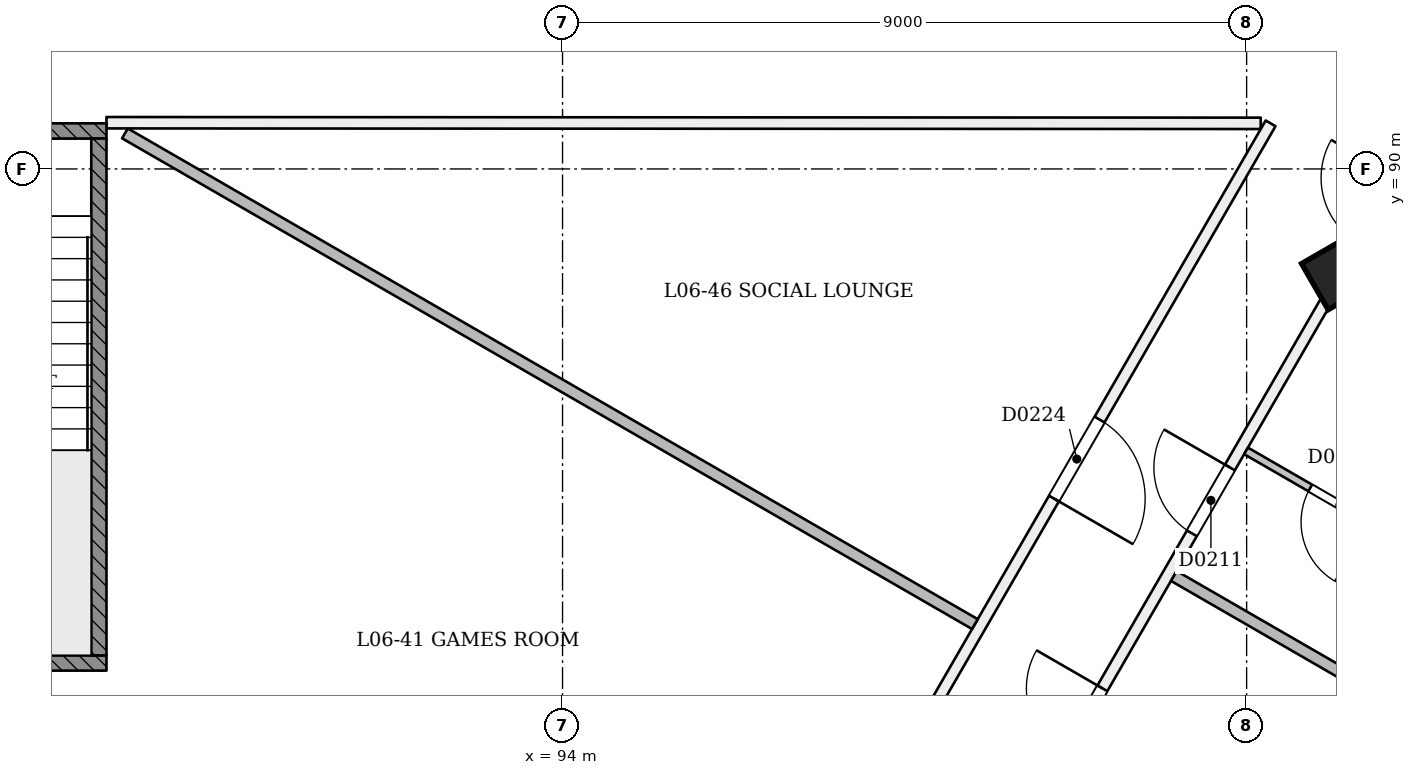
"""IFC4 building model, lengths in metres.
Left out: names, types, materials, properties, quantities, classifications, styles, units other than length and angle.
Written with IfcOpenShell. Run it as: python <this file> out.ifc"""

import sys

from ifc_helpers import new_model, si_unit, direction, frame, frame_2d, origin, origin_2d, place, context, subcontext, project, spatial, rectangle, extrude, element, fill, save


model = new_model("IFC4")
c1 = context("Model", 3, precision=1e-05, world=origin(), true_north=direction((0.0, 1.0)))
c2 = subcontext(c1, "Body", "Model", "MODEL_VIEW")
j1 = project(units=[si_unit("LENGTHUNIT", "METRE"), si_unit("PLANEANGLEUNIT", "RADIAN")], contexts=[c1])
p1 = place(None, origin())
s1 = spatial("IfcSite", under=j1, at=p1, CompositionType="ELEMENT")
p2 = place(p1, origin())
s2 = spatial("IfcBuilding", under=s1, at=p2, CompositionType="ELEMENT")
p3 = place(p2, frame((0.0, 0.0, 30.6)))
s3 = spatial("IfcBuildingStorey", under=s2, at=p3, CompositionType="ELEMENT", Elevation=30.6)
p4 = place(p3, frame((104.228, 88.579, -0.021), z_axis=(-0.02215519141, 0.038415882353, 0.999016199807), x_axis=(-0.500657429676, -0.865361475843, 0.022173277538)))
e1 = element("IfcColumn", 1, at=p4, inside=s3, PredefinedType="COLUMN", context=c2, shape_type="SweptSolid", body=[
    extrude(rectangle(XDim=0.7, YDim=0.7, at=origin_2d()), origin(), (0.0, 0.0, 1.0), 3.604),
])
p5 = place(p3, frame((86.227, 57.403, 0.0), z_axis=(0.0, 0.0, 1.0), x_axis=(0.5000018851, 0.866024315419, 0.0)))
e2 = element("IfcWall", 2, at=p5, inside=s3, PredefinedType="PARTITIONING", context=c2, shape_type="SweptSolid", body=[
    extrude(rectangle(XDim=45.0, YDim=0.15, at=frame_2d((22.5, 0.0))), origin(), (0.0, 0.0, 1.0), 2.7),
])
p6 = place(p5, frame((0.72, 0.0, 0.0)))
e3 = element("IfcOpeningElement", 3, at=p6, cuts=e2, PredefinedType="OPENING", context=c2, shape_type="SweptSolid", body=[
    extrude(rectangle(XDim=1.0, YDim=2.1, at=frame_2d((0.5, 1.05))), frame((0.0, 0.085, 0.0), z_axis=(0.0, -1.0, 0.0), x_axis=(1.0, 0.0, 0.0)), (0.0, 0.0, 1.0), 0.171),
])
p7 = place(p5, frame((5.22, 0.0, 0.0)))
e4 = element("IfcOpeningElement", 4, at=p7, cuts=e2, PredefinedType="OPENING", context=c2, shape_type="SweptSolid", body=[
    extrude(rectangle(XDim=1.0, YDim=2.1, at=frame_2d((0.5, 1.05))), frame((0.0, 0.085, 0.0), z_axis=(0.0, -1.0, 0.0), x_axis=(1.0, 0.0, 0.0)), (0.0, 0.0, 1.0), 0.171),
])
p8 = place(p5, frame((11.78, 0.0, 0.0)))
e5 = element("IfcOpeningElement", 5, at=p8, cuts=e2, PredefinedType="OPENING", context=c2, shape_type="SweptSolid", body=[
    extrude(rectangle(XDim=1.0, YDim=2.1, at=frame_2d((0.5, 1.05))), frame((0.0, 0.085, 0.0), z_axis=(0.0, -1.0, 0.0), x_axis=(1.0, 0.0, 0.0)), (0.0, 0.0, 1.0), 0.171),
])
p9 = place(p5, frame((14.22, 0.0, 0.0)))
e6 = element("IfcOpeningElement", 6, at=p9, cuts=e2, PredefinedType="OPENING", context=c2, shape_type="SweptSolid", body=[
    extrude(rectangle(XDim=1.0, YDim=2.1, at=frame_2d((0.5, 1.05))), frame((0.0, 0.085, 0.0), z_axis=(0.0, -1.0, 0.0), x_axis=(1.0, 0.0, 0.0)), (0.0, 0.0, 1.0), 0.171),
])
p10 = place(p5, frame((19.75, 0.0, 0.0)))
e7 = element("IfcOpeningElement", 7, at=p10, cuts=e2, PredefinedType="OPENING", context=c2, shape_type="SweptSolid", body=[
    extrude(rectangle(XDim=1.0, YDim=2.1, at=frame_2d((0.5, 1.05))), frame((0.0, 0.085, 0.0), z_axis=(0.0, -1.0, 0.0), x_axis=(1.0, 0.0, 0.0)), (0.0, 0.0, 1.0), 0.171),
])
p11 = place(p5, frame((23.105, 0.0, 0.0)))
e8 = element("IfcOpeningElement", 8, at=p11, cuts=e2, PredefinedType="OPENING", context=c2, shape_type="SweptSolid", body=[
    extrude(rectangle(XDim=1.0, YDim=2.1, at=frame_2d((0.5, 1.05))), frame((0.0, 0.085, 0.0), z_axis=(0.0, -1.0, 0.0), x_axis=(1.0, 0.0, 0.0)), (0.0, 0.0, 1.0), 0.171),
])
p12 = place(p5, frame((28.75, 0.0, 0.0)))
e9 = element("IfcOpeningElement", 9, at=p12, cuts=e2, PredefinedType="OPENING", context=c2, shape_type="SweptSolid", body=[
    extrude(rectangle(XDim=1.0, YDim=2.1, at=frame_2d((0.5, 1.05))), frame((0.0, 0.085, 0.0), z_axis=(0.0, -1.0, 0.0), x_axis=(1.0, 0.0, 0.0)), (0.0, 0.0, 1.0), 0.171),
])
p13 = place(p5, frame((32.105, 0.0, 0.0)))
e10 = element("IfcOpeningElement", 10, at=p13, cuts=e2, PredefinedType="OPENING", context=c2, shape_type="SweptSolid", body=[
    extrude(rectangle(XDim=1.0, YDim=2.1, at=frame_2d((0.5, 1.05))), frame((0.0, 0.085, 0.0), z_axis=(0.0, -1.0, 0.0), x_axis=(1.0, 0.0, 0.0)), (0.0, 0.0, 1.0), 0.171),
])
p14 = place(p5, frame((36.504, 0.0, 0.0)))
e11 = element("IfcOpeningElement", 11, at=p14, cuts=e2, PredefinedType="OPENING", context=c2, shape_type="SweptSolid", body=[
    extrude(rectangle(XDim=1.0, YDim=2.1, at=frame_2d((0.5, 1.05))), frame((0.0, 0.085, 0.0), z_axis=(0.0, -1.0, 0.0), x_axis=(1.0, 0.0, 0.0)), (0.0, 0.0, 1.0), 0.171),
])
p15 = place(p5, frame((38.654, 0.0, 0.0)))
e12 = element("IfcOpeningElement", 12, at=p15, cuts=e2, PredefinedType="OPENING", context=c2, shape_type="SweptSolid", body=[
    extrude(rectangle(XDim=1.0, YDim=2.1, at=frame_2d((0.5, 1.05))), frame((0.0, 0.085, 0.0), z_axis=(0.0, -1.0, 0.0), x_axis=(1.0, 0.0, 0.0)), (0.0, 0.0, 1.0), 0.171),
])
p16 = place(p5, frame((41.071, 0.0, 0.0)))
e13 = element("IfcOpeningElement", 13, at=p16, cuts=e2, PredefinedType="OPENING", context=c2, shape_type="SweptSolid", body=[
    extrude(rectangle(XDim=1.1, YDim=2.1, at=frame_2d((0.55, 1.05))), frame((0.0, 0.085, 0.0), z_axis=(0.0, -1.0, 0.0), x_axis=(1.0, 0.0, 0.0)), (0.0, 0.0, 1.0), 0.171),
])
p17 = place(p3, frame((103.315, 90.6, 0.0), z_axis=(0.0, 0.0, 1.0), x_axis=(-0.499999056994, -0.866025948229, 0.0)))
e14 = element("IfcWall", 14, at=p17, inside=s3, PredefinedType="PARTITIONING", context=c2, shape_type="SweptSolid", body=[
    extrude(rectangle(XDim=36.292, YDim=0.15, at=frame_2d((18.146, 0.0))), origin(), (0.0, 0.0, 1.0), 3.1),
])
p18 = place(p17, frame((10.576, 0.0, 0.0)))
e15 = element("IfcOpeningElement", 15, at=p18, cuts=e14, PredefinedType="OPENING", context=c2, shape_type="SweptSolid", body=[
    extrude(rectangle(XDim=1.2, YDim=2.1, at=frame_2d((0.6, 1.05))), frame((0.0, 0.085, 0.0), z_axis=(0.0, -1.0, 0.0), x_axis=(1.0, 0.0, 0.0)), (0.0, 0.0, 1.0), 0.171),
])
p19 = place(p17, frame((28.59, 0.0, 0.0)))
e16 = element("IfcOpeningElement", 16, at=p19, cuts=e14, PredefinedType="OPENING", context=c2, shape_type="SweptSolid", body=[
    extrude(rectangle(XDim=1.2, YDim=2.1, at=frame_2d((0.6, 1.05))), frame((0.0, 0.085, 0.0), z_axis=(0.0, -1.0, 0.0), x_axis=(1.0, 0.0, 0.0)), (0.0, 0.0, 1.0), 0.171),
])
p20 = place(p17, frame((17.248, 0.0, 0.0)))
e17 = element("IfcOpeningElement", 17, at=p20, cuts=e14, PredefinedType="OPENING", context=c2, shape_type="SweptSolid", body=[
    extrude(rectangle(XDim=1.2, YDim=2.1, at=frame_2d((0.6, 1.05))), frame((0.0, 0.085, 0.0), z_axis=(0.0, -1.0, 0.0), x_axis=(1.0, 0.0, 0.0)), (0.0, 0.0, 1.0), 0.171),
])
p21 = place(p17, frame((4.5, 0.0, 0.0)))
e18 = element("IfcOpeningElement", 18, at=p21, cuts=e14, PredefinedType="OPENING", context=c2, shape_type="SweptSolid", body=[
    extrude(rectangle(XDim=1.2, YDim=2.1, at=frame_2d((0.6, 1.05))), frame((0.0, 0.085, 0.0), z_axis=(0.0, -1.0, 0.0), x_axis=(1.0, 0.0, 0.0)), (0.0, 0.0, 1.0), 0.171),
])
p22 = place(p17, frame((21.947, 0.0, 0.0)))
e19 = element("IfcOpeningElement", 19, at=p22, cuts=e14, PredefinedType="OPENING", context=c2, shape_type="SweptSolid", body=[
    extrude(rectangle(XDim=1.2, YDim=2.1, at=frame_2d((0.6, 1.05))), frame((0.0, 0.085, 0.0), z_axis=(0.0, -1.0, 0.0), x_axis=(1.0, 0.0, 0.0)), (0.0, 0.0, 1.0), 0.171),
])
p23 = place(p3, frame((88.0, 90.608, 0.0), z_axis=(0.0, 0.0, 1.0), x_axis=(0.999999859256, -0.000530555079, 0.0)))
e20 = element("IfcWall", 20, at=p23, inside=s3, PredefinedType="PARTITIONING", context=c2, shape_type="SweptSolid", body=[
    extrude(rectangle(XDim=15.185, YDim=0.15, at=frame_2d((7.593, 0.0))), origin(), (0.0, 0.0, 1.0), 3.1),
])
p24 = place(p3, frame((107.537, 81.473, 0.0), z_axis=(0.0, 0.0, 1.0), x_axis=(-0.866025401434, 0.500000004071, 0.0)))
e21 = element("IfcWall", 21, at=p24, inside=s3, PredefinedType="PARTITIONING", context=c2, shape_type="SweptSolid", body=[
    extrude(rectangle(XDim=6.345, YDim=0.15, at=frame_2d((3.173, 0.0))), origin(), (0.0, 0.0, 1.0), 2.6),
])
p25 = place(p3, frame((105.525, 84.828, 0.0), z_axis=(0.0, 0.0, 1.0), x_axis=(-0.865989585315, 0.500062034277, 0.0)))
e22 = element("IfcWall", 22, at=p25, inside=s3, PredefinedType="PARTITIONING", context=c2, shape_type="SweptSolid", body=[
    extrude(rectangle(XDim=2.925, YDim=0.1, at=frame_2d((1.462, 0.0))), origin(), (0.0, 0.0, 1.0), 3.1),
])
p26 = place(p25, frame((1.05, 0.0, 0.0)))
e23 = element("IfcOpeningElement", 23, at=p26, cuts=e22, PredefinedType="OPENING", context=c2, shape_type="SweptSolid", body=[
    extrude(rectangle(XDim=0.9, YDim=2.1, at=frame_2d((0.45, 1.05))), frame((0.0, 0.061, 0.0), z_axis=(0.0, -1.0, 0.0), x_axis=(1.0, 0.0, 0.0)), (0.0, 0.0, 1.0), 0.121),
])
p27 = place(p3, frame((85.698, 83.4, 0.0), z_axis=(0.0, 0.0, 1.0), x_axis=(0.866020254168, -0.500008919292, 0.0)))
e24 = element("IfcWall", 24, at=p27, inside=s3, PredefinedType="PARTITIONING", context=c2, shape_type="SweptSolid", body=[
    extrude(rectangle(XDim=11.582, YDim=0.15, at=frame_2d((5.791, 0.0))), origin(), (0.0, 0.0, 1.0), 3.1),
])
p28 = place(p3, frame((99.425, 84.012, 0.0), z_axis=(0.0, 0.0, 1.0), x_axis=(-0.866028468914, 0.499994691002, 0.0)))
e25 = element("IfcWall", 25, at=p28, inside=s3, PredefinedType="PARTITIONING", context=c2, shape_type="SweptSolid", body=[
    extrude(rectangle(XDim=12.912, YDim=0.15, at=frame_2d((6.456, 0.0))), origin(), (0.0, 0.0, 1.0), 3.1),
])
p29 = place(p3, frame((82.0, 90.5, 0.0), z_axis=(0.0, 0.0, 1.0), x_axis=(1.0, 0.0, 0.0)))
e26 = element("IfcWall", 26, at=p29, inside=s3, PredefinedType="SOLIDWALL", context=c2, shape_type="SweptSolid", body=[
    extrude(rectangle(XDim=6.0, YDim=0.2, at=frame_2d((3.0, 0.0))), origin(), (0.0, 0.0, 1.0), 3.1),
])
p30 = place(p29, frame((0.95, 0.0, 0.0)))
e27 = element("IfcOpeningElement", 27, at=p30, cuts=e26, PredefinedType="OPENING", context=c2, shape_type="SweptSolid", body=[
    extrude(rectangle(XDim=1.2, YDim=2.1, at=frame_2d((0.6, 1.05))), frame((0.0, 0.11, 0.0), z_axis=(0.0, -1.0, 0.0), x_axis=(1.0, 0.0, 0.0)), (0.0, 0.0, 1.0), 0.221),
])
p31 = place(p29, frame((3.85, 0.0, 0.0)))
e28 = element("IfcOpeningElement", 28, at=p31, cuts=e26, PredefinedType="OPENING", context=c2, shape_type="SweptSolid", body=[
    extrude(rectangle(XDim=1.2, YDim=2.1, at=frame_2d((0.6, 1.05))), frame((0.0, 0.11, 0.0), z_axis=(0.0, -1.0, 0.0), x_axis=(1.0, 0.0, 0.0)), (0.0, 0.0, 1.0), 0.221),
])
p32 = place(p3, frame((82.0, 83.5, 0.0), z_axis=(0.0, 0.0, 1.0), x_axis=(1.0, 0.0, 0.0)))
e29 = element("IfcWall", 29, at=p32, inside=s3, PredefinedType="SOLIDWALL", context=c2, shape_type="SweptSolid", body=[
    extrude(rectangle(XDim=6.0, YDim=0.2, at=frame_2d((3.0, 0.0))), origin(), (0.0, 0.0, 1.0), 3.1),
])
p33 = place(p3, frame((87.9, 83.6, 0.0), z_axis=(0.0, 0.0, 1.0), x_axis=(0.0, 1.0, 0.0)))
e30 = element("IfcWall", 30, at=p33, inside=s3, PredefinedType="SOLIDWALL", context=c2, shape_type="SweptSolid", body=[
    extrude(rectangle(XDim=6.8, YDim=0.2, at=frame_2d((3.4, 0.0))), origin(), (0.0, 0.0, 1.0), 3.1),
])
p34 = place(p12, origin())
e31 = element("IfcDoor", 31, at=p34, inside=s3, OperationType="SINGLE_SWING_RIGHT", PredefinedType="NOTDEFINED", context=c2, shape_type="SweptSolid", body=[
    extrude(rectangle(XDim=1.0, YDim=2.1, at=frame_2d((0.5, 1.05))), frame((0.0, 0.025, 0.0), z_axis=(0.0, -1.0, 0.0), x_axis=(1.0, 0.0, 0.0)), (0.0, 0.0, 1.0), 0.05),
])
fill(e9, e31)
p35 = place(p13, origin())
e32 = element("IfcDoor", 32, at=p35, inside=s3, OperationType="SINGLE_SWING_RIGHT", PredefinedType="NOTDEFINED", context=c2, shape_type="SweptSolid", body=[
    extrude(rectangle(XDim=1.0, YDim=2.1, at=frame_2d((0.5, 1.05))), frame((0.0, 0.025, 0.0), z_axis=(0.0, -1.0, 0.0), x_axis=(1.0, 0.0, 0.0)), (0.0, 0.0, 1.0), 0.05),
])
fill(e10, e32)
p36 = place(p26, origin())
e33 = element("IfcDoor", 33, at=p36, inside=s3, OperationType="SINGLE_SWING_LEFT", PredefinedType="NOTDEFINED", context=c2, shape_type="SweptSolid", body=[
    extrude(rectangle(XDim=0.9, YDim=2.1, at=frame_2d((0.45, 1.05))), frame((0.0, 0.025, 0.0), z_axis=(0.0, -1.0, 0.0), x_axis=(1.0, 0.0, 0.0)), (0.0, 0.0, 1.0), 0.05),
])
fill(e23, e33)
p37 = place(p21, origin())
e34 = element("IfcDoor", 34, at=p37, inside=s3, OperationType="SINGLE_SWING_RIGHT", PredefinedType="NOTDEFINED", context=c2, shape_type="SweptSolid", body=[
    extrude(rectangle(XDim=1.2, YDim=2.1, at=frame_2d((0.6, 1.05))), frame((0.0, 0.025, 0.0), z_axis=(0.0, -1.0, 0.0), x_axis=(1.0, 0.0, 0.0)), (0.0, 0.0, 1.0), 0.05),
])
fill(e18, e34)
save(model, sys.argv[1])
